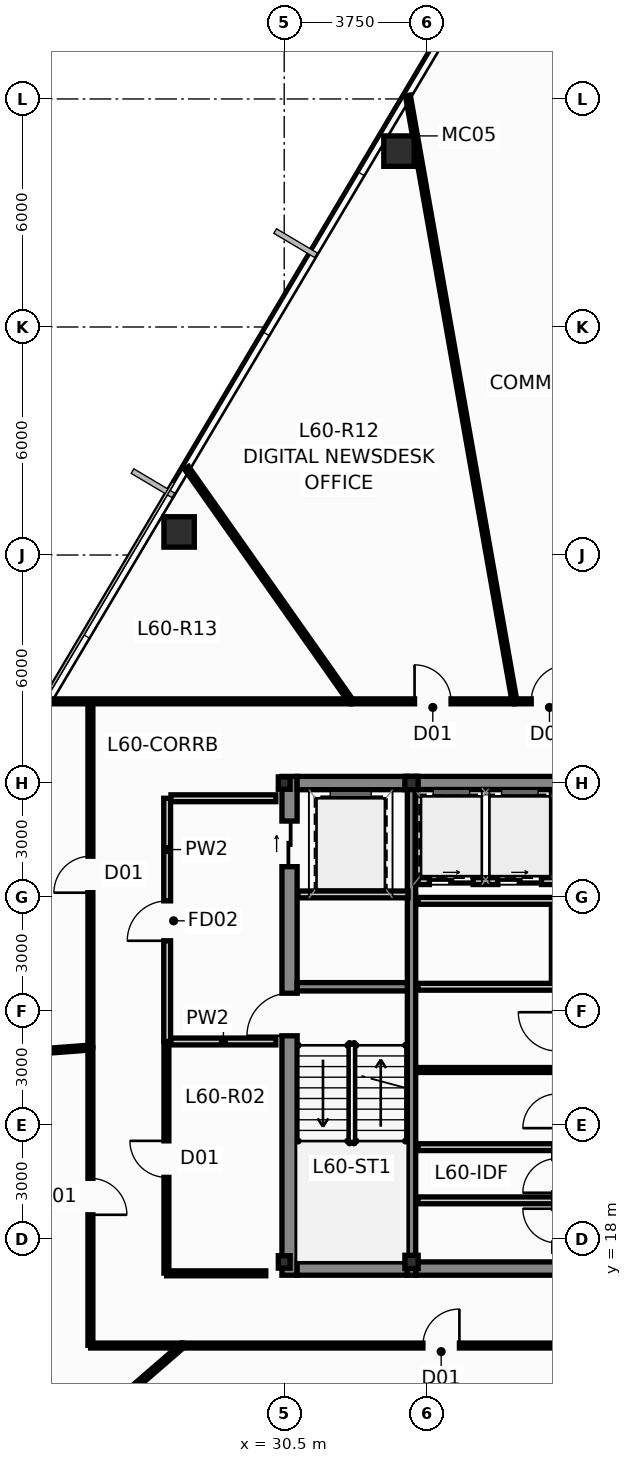
"""IFC4 building model, lengths in metres.
Left out: names, types, materials, properties, quantities, classifications, styles, units other than length and angle.
Written with IfcOpenShell. Run it as: python <this file> out.ifc"""

import sys

from ifc_helpers import new_model, si_unit, direction, frame, frame_2d, origin, origin_2d, place, context, subcontext, project, spatial, rectangle, hollow_rectangle, i_section, extrude, source, transform, mapped, element, fill, save


model = new_model("IFC4")
c1 = context("Model", 3, precision=1e-05, world=origin(), true_north=direction((0.0, 1.0)))
c2 = subcontext(c1, "Body", "Model", "MODEL_VIEW")
j1 = project(units=[si_unit("LENGTHUNIT", "METRE"), si_unit("PLANEANGLEUNIT", "RADIAN")], contexts=[c1])
p1 = place(None, origin())
s1 = spatial("IfcSite", under=j1, at=p1, CompositionType="ELEMENT")
p2 = place(p1, origin())
s2 = spatial("IfcBuilding", under=s1, at=p2, CompositionType="ELEMENT")
p3 = place(p2, frame((0.0, 0.0, 229.85)))
s3 = spatial("IfcBuildingStorey", under=s2, at=p3, CompositionType="ELEMENT", Elevation=229.85)
m1 = source(origin(), c2, "Body", "SweptSolid", [
    extrude(i_section(OverallWidth=0.311, OverallDepth=0.327, WebThickness=0.016, FlangeThickness=0.025, at=origin_2d()), origin(), (0.0, 0.0, 1.0), 3.65),
])
for number, where, z_axis, x_axis in (
    (1, (30.5, 17.4, 0.0), (0.0, 0.0, 1.0), (1.0, 0.0, 0.0)),
    (2, (30.5, 30.0, 0.0), (0.0, 0.0, 1.0), (1.0, 0.0, 0.0)),
):
    element("IfcColumn", number, at=place(p3, frame(where, z_axis=z_axis, x_axis=x_axis)), inside=s3, PredefinedType="COLUMN", context=c2, shape_type="MappedRepresentation", body=[
        mapped(m1, transform((0.0, 0.0, 0.0), scale=1.0)),
    ])
m2 = source(origin(), c2, "Body", "SweptSolid", [
    extrude(hollow_rectangle(XDim=0.35, YDim=0.35, WallThickness=0.016, at=origin_2d()), origin(), (0.0, 0.0, 1.0), 3.65),
])
for number, where, z_axis, x_axis in (
    (3, (33.85, 17.4, 0.0), (0.0, 0.0, 1.0), (1.0, 0.0, 0.0)),
    (4, (33.85, 30.0, 0.0), (0.0, 0.0, 1.0), (1.0, 0.0, 0.0)),
):
    element("IfcColumn", number, at=place(p3, frame(where, z_axis=z_axis, x_axis=x_axis)), inside=s3, PredefinedType="COLUMN", context=c2, shape_type="MappedRepresentation", body=[
        mapped(m2, transform((0.0, 0.0, 0.0), scale=1.0)),
    ])
p4 = place(p3, frame((30.64, 17.05, 0.0), z_axis=(0.0, 0.0, 1.0), x_axis=(0.0, 1.0, 0.0)))
e5 = element("IfcWall", 5, at=p4, inside=s3, PredefinedType="SHEAR", context=c2, shape_type="SweptSolid", body=[
    extrude(rectangle(XDim=13.125, YDim=0.4, at=frame_2d((6.562, 0.0))), origin(), (0.0, 0.0, 1.0), 3.65),
])
p5 = place(p4, frame((6.3, 0.0, 0.0)))
e6 = element("IfcOpeningElement", 6, at=p5, cuts=e5, PredefinedType="OPENING", context=c2, shape_type="SweptSolid", body=[
    extrude(rectangle(XDim=1.12, YDim=2.15, at=frame_2d((0.56, 1.075))), frame((0.0, 0.212, 0.0), z_axis=(0.0, -1.0, 0.0), x_axis=(1.0, 0.0, 0.0)), (0.0, 0.0, 1.0), 0.424),
])
p6 = place(p4, frame((10.75, 0.0, 0.0)))
e7 = element("IfcOpeningElement", 7, at=p6, cuts=e5, PredefinedType="OPENING", context=c2, shape_type="SweptSolid", body=[
    extrude(rectangle(XDim=1.2, YDim=2.2, at=frame_2d((0.6, 1.1))), frame((0.0, 0.212, 0.0), z_axis=(0.0, -1.0, 0.0), x_axis=(1.0, 0.0, 0.0)), (0.0, 0.0, 1.0), 0.424),
])
p7 = place(p3, frame((30.84, 17.225, 0.0), z_axis=(0.0, 0.0, 1.0), x_axis=(1.0, 0.0, 0.0)))
e8 = element("IfcWall", 8, at=p7, inside=s3, PredefinedType="SHEAR", context=c2, shape_type="SweptSolid", body=[
    extrude(rectangle(XDim=2.9, YDim=0.35, at=frame_2d((1.45, 0.0))), origin(), (0.0, 0.0, 1.0), 3.65),
])
p8 = place(p3, frame((33.96, 17.225, 0.0), z_axis=(0.0, 0.0, 1.0), x_axis=(1.0, 0.0, 0.0)))
e9 = element("IfcWall", 9, at=p8, inside=s3, PredefinedType="SHEAR", context=c2, shape_type="SweptSolid", body=[
    extrude(rectangle(XDim=8.08, YDim=0.35, at=frame_2d((4.04, 0.0))), origin(), (0.0, 0.0, 1.0), 3.65),
])
p9 = place(p3, frame((30.84, 30.0, 0.0), z_axis=(0.0, 0.0, 1.0), x_axis=(1.0, 0.0, 0.0)))
e10 = element("IfcWall", 10, at=p9, inside=s3, PredefinedType="SHEAR", context=c2, shape_type="SweptSolid", body=[
    extrude(rectangle(XDim=2.9, YDim=0.35, at=frame_2d((1.45, 0.0))), origin(), (0.0, 0.0, 1.0), 3.65),
])
p10 = place(p3, frame((33.96, 30.0, 0.0), z_axis=(0.0, 0.0, 1.0), x_axis=(1.0, 0.0, 0.0)))
e11 = element("IfcWall", 11, at=p10, inside=s3, PredefinedType="SHEAR", context=c2, shape_type="SweptSolid", body=[
    extrude(rectangle(XDim=3.78, YDim=0.35, at=frame_2d((1.89, 0.0))), origin(), (0.0, 0.0, 1.0), 3.65),
])
p11 = place(p3, frame((33.85, 17.05, 0.0), z_axis=(0.0, 0.0, 1.0), x_axis=(0.0, 1.0, 0.0)))
e12 = element("IfcWall", 12, at=p11, inside=s3, PredefinedType="SHEAR", context=c2, shape_type="SweptSolid", body=[
    extrude(rectangle(XDim=13.125, YDim=0.22, at=frame_2d((6.562, 0.0))), origin(), (0.0, 0.0, 1.0), 3.65),
])
p12 = place(p3, frame((30.84, 24.64, 0.0), z_axis=(0.0, 0.0, 1.0), x_axis=(1.0, 0.0, 0.0)))
e13 = element("IfcWall", 13, at=p12, inside=s3, PredefinedType="SHEAR", context=c2, shape_type="SweptSolid", body=[
    extrude(rectangle(XDim=2.9, YDim=0.22, at=frame_2d((1.45, 0.0))), origin(), (0.0, 0.0, 1.0), 3.65),
])
m3 = source(origin(), c2, "Body", "SweptSolid", [
    extrude(hollow_rectangle(XDim=0.8, YDim=0.8, WallThickness=0.045, at=origin_2d()), origin(), (0.0, 0.0, 1.0), 3.651),
])
p13 = place(p3, frame((33.52, 46.628, 0.0), z_axis=(0.023872754168, 0.001805502416, 0.999713374808), x_axis=(-0.075414875552, 0.997152243414, 0.0)))
e14 = element("IfcColumn", 14, at=p13, inside=s3, PredefinedType="COLUMN", context=c2, shape_type="MappedRepresentation", body=[
    mapped(m3, transform((0.0, 0.0, 0.0), scale=1.0)),
])
m4 = source(origin(), c2, "Body", "SweptSolid", [
    extrude(hollow_rectangle(XDim=0.8, YDim=0.8, WallThickness=0.045, at=origin_2d()), origin(), (0.0, 0.0, 1.0), 3.651),
])
p14 = place(p3, frame((27.734, 36.607, 0.0), z_axis=(0.019393985636, -0.006085698941, 0.999793397452), x_axis=(0.299398805134, 0.954128060317, 0.0)))
e15 = element("IfcColumn", 15, at=p14, inside=s3, PredefinedType="COLUMN", context=c2, shape_type="MappedRepresentation", body=[
    mapped(m4, transform((0.0, 0.0, 0.0), scale=1.0)),
])
p15 = place(p3, frame((34.02, 26.9, 0.0), z_axis=(0.0, 0.0, 1.0), x_axis=(1.0, 0.0, 0.0)))
e16 = element("IfcWall", 16, at=p15, inside=s3, PredefinedType="PARTITIONING", context=c2, shape_type="SweptSolid", body=[
    extrude(rectangle(XDim=3.6, YDim=0.18, at=frame_2d((1.8, 0.0))), origin(), (0.0, 0.0, 1.0), 3.4),
])
p16 = place(p3, frame((37.62, 24.8, 0.0), z_axis=(0.0, 0.0, 1.0), x_axis=(0.0, 1.0, 0.0)))
e17 = element("IfcWall", 17, at=p16, inside=s3, PredefinedType="PARTITIONING", context=c2, shape_type="SweptSolid", body=[
    extrude(rectangle(XDim=2.0, YDim=0.18, at=frame_2d((1.0, 0.0))), origin(), (0.0, 0.0, 1.0), 3.4),
])
p17 = place(p3, frame((34.02, 24.64, 0.0), z_axis=(0.0, 0.0, 1.0), x_axis=(1.0, 0.0, 0.0)))
e18 = element("IfcWall", 18, at=p17, inside=s3, PredefinedType="PARTITIONING", context=c2, shape_type="SweptSolid", body=[
    extrude(rectangle(XDim=3.68, YDim=0.18, at=frame_2d((1.84, 0.0))), origin(), (0.0, 0.0, 1.0), 3.4),
])
p18 = place(p3, frame((34.02, 27.42, 0.0), z_axis=(0.0, 0.0, 1.0), x_axis=(1.0, 0.0, 0.0)))
e19 = element("IfcWall", 19, at=p18, inside=s3, PredefinedType="PARTITIONING", context=c2, shape_type="SweptSolid", body=[
    extrude(rectangle(XDim=3.66, YDim=0.18, at=frame_2d((1.83, 0.0))), origin(), (0.0, 0.0, 1.0), 3.4),
])
p19 = place(p18, frame((0.3, 0.0, 0.0)))
e20 = element("IfcOpeningElement", 20, at=p19, cuts=e19, PredefinedType="OPENING", context=c2, shape_type="SweptSolid", body=[
    extrude(rectangle(XDim=1.15, YDim=2.2, at=frame_2d((0.575, 1.1))), frame((0.0, 0.102, 0.0), z_axis=(0.0, -1.0, 0.0), x_axis=(1.0, 0.0, 0.0)), (0.0, 0.0, 1.0), 0.204),
])
p20 = place(p18, frame((2.1, 0.0, 0.0)))
e21 = element("IfcOpeningElement", 21, at=p20, cuts=e19, PredefinedType="OPENING", context=c2, shape_type="SweptSolid", body=[
    extrude(rectangle(XDim=1.15, YDim=2.2, at=frame_2d((0.575, 1.1))), frame((0.0, 0.102, 0.0), z_axis=(0.0, -1.0, 0.0), x_axis=(1.0, 0.0, 0.0)), (0.0, 0.0, 1.0), 0.204),
])
p21 = place(p3, frame((37.62, 27.64, 0.0), z_axis=(0.0, 0.0, 1.0), x_axis=(0.0, 1.0, 0.0)))
e22 = element("IfcWall", 22, at=p21, inside=s3, PredefinedType="PARTITIONING", context=c2, shape_type="SweptSolid", body=[
    extrude(rectangle(XDim=2.11, YDim=0.18, at=frame_2d((1.055, 0.0))), origin(), (0.0, 0.0, 1.0), 3.4),
])
p22 = place(p3, frame((27.42, 23.2, 0.0), z_axis=(0.0, 0.0, 1.0), x_axis=(0.0, 1.0, 0.0)))
e23 = element("IfcWall", 23, at=p22, inside=s3, PredefinedType="PARTITIONING", context=c2, shape_type="SweptSolid", body=[
    extrude(rectangle(XDim=6.4, YDim=0.18, at=frame_2d((3.2, 0.0))), origin(), (0.0, 0.0, 1.0), 3.129),
])
p23 = place(p22, frame((2.65, 0.0, 0.0)))
e24 = element("IfcOpeningElement", 24, at=p23, cuts=e23, PredefinedType="OPENING", context=c2, shape_type="SweptSolid", body=[
    extrude(rectangle(XDim=1.05, YDim=2.15, at=frame_2d((0.525, 1.075))), frame((0.0, 0.102, 0.0), z_axis=(0.0, -1.0, 0.0), x_axis=(1.0, 0.0, 0.0)), (0.0, 0.0, 1.0), 0.204),
])
p24 = place(p3, frame((27.52, 23.2, 0.0), z_axis=(0.0, 0.0, 1.0), x_axis=(1.0, 0.0, 0.0)))
e25 = element("IfcWall", 25, at=p24, inside=s3, PredefinedType="PARTITIONING", context=c2, shape_type="SweptSolid", body=[
    extrude(rectangle(XDim=2.76, YDim=0.18, at=frame_2d((1.38, 0.0))), origin(), (0.0, 0.0, 1.0), 3.4),
])
p25 = place(p3, frame((27.52, 29.6, 0.0), z_axis=(0.0, 0.0, 1.0), x_axis=(1.0, 0.0, 0.0)))
e26 = element("IfcWall", 26, at=p25, inside=s3, PredefinedType="PARTITIONING", context=c2, shape_type="SweptSolid", body=[
    extrude(rectangle(XDim=2.76, YDim=0.18, at=frame_2d((1.38, 0.0))), origin(), (0.0, 0.0, 1.0), 2.985),
])
p26 = place(p3, frame((30.86, 27.07, 0.0), z_axis=(0.0, 0.0, 1.0), x_axis=(1.0, 0.0, 0.0)))
e27 = element("IfcWall", 27, at=p26, inside=s3, PredefinedType="PARTITIONING", context=c2, shape_type="SweptSolid", body=[
    extrude(rectangle(XDim=2.9, YDim=0.18, at=frame_2d((1.45, 0.0))), origin(), (0.0, 0.0, 1.0), 3.4),
])
p27 = place(p3, frame((34.02, 20.42, 0.0), z_axis=(0.0, 0.0, 1.0), x_axis=(1.0, 0.0, 0.0)))
e28 = element("IfcWall", 28, at=p27, inside=s3, PredefinedType="PARTITIONING", context=c2, shape_type="SweptSolid", body=[
    extrude(rectangle(XDim=3.64, YDim=0.18, at=frame_2d((1.82, 0.0))), origin(), (0.0, 0.0, 1.0), 3.4),
])
p28 = place(p3, frame((34.02, 22.45, 0.0), z_axis=(0.0, 0.0, 1.0), x_axis=(1.0, 0.0, 0.0)))
e29 = element("IfcWall", 29, at=p28, inside=s3, PredefinedType="PARTITIONING", context=c2, shape_type="SweptSolid", body=[
    extrude(rectangle(XDim=3.58, YDim=0.13, at=frame_2d((1.79, 0.0))), origin(), (0.0, 0.0, 1.0), 3.4),
])
p29 = place(p3, frame((34.02, 19.02, 0.0), z_axis=(0.0, 0.0, 1.0), x_axis=(1.0, 0.0, 0.0)))
e30 = element("IfcWall", 30, at=p29, inside=s3, PredefinedType="PARTITIONING", context=c2, shape_type="SweptSolid", body=[
    extrude(rectangle(XDim=3.58, YDim=0.18, at=frame_2d((1.79, 0.0))), origin(), (0.0, 0.0, 1.0), 3.4),
])
p30 = place(p3, frame((33.754, 48.093, 0.0), z_axis=(0.0, 0.0, 1.0), x_axis=(0.17333175086, -0.984863495183, 0.0)))
e31 = element("IfcWall", 31, at=p30, inside=s3, PredefinedType="PARTITIONING", context=c2, shape_type="SweptSolid", body=[
    extrude(rectangle(XDim=16.182, YDim=0.13, at=frame_2d((8.091, 0.0))), origin(), (0.0, 0.0, 1.0), 3.4),
])
p31 = place(p3, frame((27.825, 15.2, 0.0), z_axis=(0.0, 0.0, 1.0), x_axis=(1.0, 0.0, 0.0)))
e32 = element("IfcWall", 32, at=p31, inside=s3, PredefinedType="PARTITIONING", context=c2, shape_type="SweptSolid", body=[
    extrude(rectangle(XDim=13.61, YDim=0.13, at=frame_2d((6.805, 0.0))), origin(), (0.0, 0.0, 1.0), 3.4),
])
p32 = place(p31, frame((6.325, 0.0, 0.0)))
e33 = element("IfcOpeningElement", 33, at=p32, cuts=e32, PredefinedType="OPENING", context=c2, shape_type="SweptSolid", body=[
    extrude(rectangle(XDim=0.96, YDim=2.15, at=frame_2d((0.48, 1.075))), frame((0.0, 0.077, 0.0), z_axis=(0.0, -1.0, 0.0), x_axis=(1.0, 0.0, 0.0)), (0.0, 0.0, 1.0), 0.154),
])
p33 = place(p3, frame((25.4, 23.045, 0.0), z_axis=(0.0, 0.0, 1.0), x_axis=(0.0, 1.0, 0.0)))
e34 = element("IfcWall", 34, at=p33, inside=s3, PredefinedType="PARTITIONING", context=c2, shape_type="SweptSolid", body=[
    extrude(rectangle(XDim=9.1, YDim=0.13, at=frame_2d((4.55, 0.0))), origin(), (0.0, 0.0, 1.0), 3.129),
])
p34 = place(p33, frame((4.07, 0.0, 0.0)))
e35 = element("IfcOpeningElement", 35, at=p34, cuts=e34, PredefinedType="OPENING", context=c2, shape_type="SweptSolid", body=[
    extrude(rectangle(XDim=0.96, YDim=2.15, at=frame_2d((0.48, 1.075))), frame((0.0, 0.077, 0.0), z_axis=(0.0, -1.0, 0.0), x_axis=(1.0, 0.0, 0.0)), (0.0, 0.0, 1.0), 0.154),
])
p35 = place(p3, frame((25.4, 23.035, 0.0), z_axis=(0.0, 0.0, 1.0), x_axis=(0.0, -1.0, 0.0)))
e36 = element("IfcWall", 36, at=p35, inside=s3, PredefinedType="PARTITIONING", context=c2, shape_type="SweptSolid", body=[
    extrude(rectangle(XDim=7.83, YDim=0.13, at=frame_2d((3.915, 0.0))), origin(), (0.0, 0.0, 1.0), 3.129),
])
p36 = place(p35, frame((3.435, 0.0, 0.0)))
e37 = element("IfcOpeningElement", 37, at=p36, cuts=e36, PredefinedType="OPENING", context=c2, shape_type="SweptSolid", body=[
    extrude(rectangle(XDim=0.96, YDim=2.15, at=frame_2d((0.48, 1.075))), frame((0.0, 0.077, 0.0), z_axis=(0.0, -1.0, 0.0), x_axis=(1.0, 0.0, 0.0)), (0.0, 0.0, 1.0), 0.154),
])
p37 = place(p3, frame((27.931, 38.293, 0.0), z_axis=(0.0, 0.0, 1.0), x_axis=(0.576007841944, -0.817444166912, 0.0)))
e38 = element("IfcWall", 38, at=p37, inside=s3, PredefinedType="PARTITIONING", context=c2, shape_type="SweptSolid", body=[
    extrude(rectangle(XDim=7.51, YDim=0.13, at=frame_2d((3.755, 0.0))), origin(), (0.0, 0.0, 1.0), 3.4),
])
p38 = place(p3, frame((18.563, 22.529, 0.0), z_axis=(0.0, 0.0, 1.0), x_axis=(0.997209201341, 0.074657945067, 0.0)))
e39 = element("IfcWall", 39, at=p38, inside=s3, PredefinedType="PARTITIONING", context=c2, shape_type="SweptSolid", body=[
    extrude(rectangle(XDim=6.851, YDim=0.13, at=frame_2d((3.425, 0.0))), origin(), (0.0, 0.0, 1.0), 3.4),
])
p39 = place(p3, frame((24.306, 32.15, 0.0), z_axis=(0.0, 0.0, 1.0), x_axis=(1.0, 0.0, 0.0)))
e40 = element("IfcWall", 40, at=p39, inside=s3, PredefinedType="PARTITIONING", context=c2, shape_type="SweptSolid", body=[
    extrude(rectangle(XDim=7.948, YDim=0.13, at=frame_2d((3.974, 0.0))), origin(), (0.0, 0.0, 1.0), 3.4),
])
p40 = place(p3, frame((27.4, 17.105, 0.0), z_axis=(0.0, 0.0, 1.0), x_axis=(0.0, 1.0, 0.0)))
e41 = element("IfcWall", 41, at=p40, inside=s3, PredefinedType="PARTITIONING", context=c2, shape_type="SweptSolid", body=[
    extrude(rectangle(XDim=6.0, YDim=0.13, at=frame_2d((3.0, 0.0))), origin(), (0.0, 0.0, 1.0), 3.4),
])
p41 = place(p40, frame((2.52, 0.0, 0.0)))
e42 = element("IfcOpeningElement", 42, at=p41, cuts=e41, PredefinedType="OPENING", context=c2, shape_type="SweptSolid", body=[
    extrude(rectangle(XDim=0.96, YDim=2.15, at=frame_2d((0.48, 1.075))), frame((0.0, 0.077, 0.0), z_axis=(0.0, -1.0, 0.0), x_axis=(1.0, 0.0, 0.0)), (0.0, 0.0, 1.0), 0.154),
])
p42 = place(p3, frame((23.524, 11.483, 0.0), z_axis=(0.0, 0.0, 1.0), x_axis=(0.756178505734, 0.654365392931, 0.0)))
e43 = element("IfcWall", 43, at=p42, inside=s3, PredefinedType="PARTITIONING", context=c2, shape_type="SweptSolid", body=[
    extrude(rectangle(XDim=5.676, YDim=0.13, at=frame_2d((2.838, 0.0))), origin(), (0.0, 0.0, 1.0), 2.985),
])
p43 = place(p3, frame((32.265, 32.15, 0.0), z_axis=(0.0, 0.0, 1.0), x_axis=(1.0, 0.0, 0.0)))
e44 = element("IfcWall", 44, at=p43, inside=s3, PredefinedType="PARTITIONING", context=c2, shape_type="SweptSolid", body=[
    extrude(rectangle(XDim=4.29, YDim=0.13, at=frame_2d((2.145, 0.0))), origin(), (0.0, 0.0, 1.0), 3.4),
])
p44 = place(p43, frame((1.665, 0.0, 0.0)))
e45 = element("IfcOpeningElement", 45, at=p44, cuts=e44, PredefinedType="OPENING", context=c2, shape_type="SweptSolid", body=[
    extrude(rectangle(XDim=0.96, YDim=2.15, at=frame_2d((0.48, 1.075))), frame((0.0, 0.077, 0.0), z_axis=(0.0, -1.0, 0.0), x_axis=(1.0, 0.0, 0.0)), (0.0, 0.0, 1.0), 0.154),
])
p45 = place(p3, frame((30.015, 17.1, 0.0), z_axis=(0.0, 0.0, 1.0), x_axis=(-1.0, 0.0, 0.0)))
e46 = element("IfcWall", 46, at=p45, inside=s3, PredefinedType="PARTITIONING", context=c2, shape_type="SweptSolid", body=[
    extrude(rectangle(XDim=2.61, YDim=0.13, at=frame_2d((1.305, 0.0))), origin(), (0.0, 0.0, 1.0), 2.985),
])
p46 = place(p3, frame((25.405, 15.2, 0.0), z_axis=(0.0, 0.0, 1.0), x_axis=(1.0, 0.0, 0.0)))
e47 = element("IfcWall", 47, at=p46, inside=s3, PredefinedType="PARTITIONING", context=c2, shape_type="SweptSolid", body=[
    extrude(rectangle(XDim=2.41, YDim=0.13, at=frame_2d((1.205, 0.0))), origin(), (0.0, 0.0, 1.0), 3.4),
])
p47 = place(p3, frame((36.565, 32.15, 0.0), z_axis=(0.0, 0.0, 1.0), x_axis=(1.0, 0.0, 0.0)))
e48 = element("IfcWall", 48, at=p47, inside=s3, PredefinedType="PARTITIONING", context=c2, shape_type="SweptSolid", body=[
    extrude(rectangle(XDim=1.83, YDim=0.13, at=frame_2d((0.915, 0.0))), origin(), (0.0, 0.0, 1.0), 3.4),
])
p48 = place(p47, frame((0.435, 0.0, 0.0)))
e49 = element("IfcOpeningElement", 49, at=p48, cuts=e48, PredefinedType="OPENING", context=c2, shape_type="SweptSolid", body=[
    extrude(rectangle(XDim=0.96, YDim=2.15, at=frame_2d((0.48, 1.075))), frame((0.0, 0.077, 0.0), z_axis=(0.0, -1.0, 0.0), x_axis=(1.0, 0.0, 0.0)), (0.0, 0.0, 1.0), 0.154),
])
p49 = place(p5, origin())
e50 = element("IfcDoor", 50, at=p49, inside=s3, OperationType="SINGLE_SWING_LEFT", PredefinedType="DOOR", context=c2, shape_type="SweptSolid", body=[
    extrude(rectangle(XDim=1.12, YDim=2.15, at=frame_2d((0.56, 1.075))), frame((0.0, 0.025, 0.0), z_axis=(0.0, -1.0, 0.0), x_axis=(1.0, 0.0, 0.0)), (0.0, 0.0, 1.0), 0.05),
])
fill(e6, e50)
p50 = place(p6, origin())
e51 = element("IfcDoor", 51, at=p50, inside=s3, OperationType="SLIDING_TO_LEFT", PredefinedType="DOOR", context=c2, shape_type="SweptSolid", body=[
    extrude(rectangle(XDim=1.2, YDim=2.2, at=frame_2d((0.6, 1.1))), frame((0.0, 0.025, 0.0), z_axis=(0.0, -1.0, 0.0), x_axis=(1.0, 0.0, 0.0)), (0.0, 0.0, 1.0), 0.05),
])
fill(e7, e51)
p51 = place(p19, origin())
e52 = element("IfcDoor", 52, at=p51, inside=s3, OperationType="SLIDING_TO_RIGHT", PredefinedType="DOOR", context=c2, shape_type="SweptSolid", body=[
    extrude(rectangle(XDim=1.15, YDim=2.2, at=frame_2d((0.575, 1.1))), frame((0.0, 0.025, 0.0), z_axis=(0.0, -1.0, 0.0), x_axis=(1.0, 0.0, 0.0)), (0.0, 0.0, 1.0), 0.05),
])
fill(e20, e52)
p52 = place(p20, origin())
e53 = element("IfcDoor", 53, at=p52, inside=s3, OperationType="SLIDING_TO_LEFT", PredefinedType="DOOR", context=c2, shape_type="SweptSolid", body=[
    extrude(rectangle(XDim=1.15, YDim=2.2, at=frame_2d((0.575, 1.1))), frame((0.0, 0.025, 0.0), z_axis=(0.0, -1.0, 0.0), x_axis=(1.0, 0.0, 0.0)), (0.0, 0.0, 1.0), 0.05),
])
fill(e21, e53)
p53 = place(p23, origin())
e54 = element("IfcDoor", 54, at=p53, inside=s3, OperationType="SINGLE_SWING_LEFT", PredefinedType="DOOR", context=c2, shape_type="SweptSolid", body=[
    extrude(rectangle(XDim=1.05, YDim=2.15, at=frame_2d((0.525, 1.075))), frame((0.0, 0.025, 0.0), z_axis=(0.0, -1.0, 0.0), x_axis=(1.0, 0.0, 0.0)), (0.0, 0.0, 1.0), 0.05),
])
fill(e24, e54)
p54 = place(p32, origin())
e55 = element("IfcDoor", 55, at=p54, inside=s3, OperationType="SINGLE_SWING_RIGHT", PredefinedType="DOOR", context=c2, shape_type="SweptSolid", body=[
    extrude(rectangle(XDim=0.96, YDim=2.15, at=frame_2d((0.48, 1.075))), frame((0.0, 0.025, 0.0), z_axis=(0.0, -1.0, 0.0), x_axis=(1.0, 0.0, 0.0)), (0.0, 0.0, 1.0), 0.05),
])
fill(e33, e55)
p55 = place(p34, origin())
e56 = element("IfcDoor", 56, at=p55, inside=s3, OperationType="SINGLE_SWING_LEFT", PredefinedType="DOOR", context=c2, shape_type="SweptSolid", body=[
    extrude(rectangle(XDim=0.96, YDim=2.15, at=frame_2d((0.48, 1.075))), frame((0.0, 0.025, 0.0), z_axis=(0.0, -1.0, 0.0), x_axis=(1.0, 0.0, 0.0)), (0.0, 0.0, 1.0), 0.05),
])
fill(e35, e56)
p56 = place(p36, origin())
e57 = element("IfcDoor", 57, at=p56, inside=s3, OperationType="SINGLE_SWING_RIGHT", PredefinedType="DOOR", context=c2, shape_type="SweptSolid", body=[
    extrude(rectangle(XDim=0.96, YDim=2.15, at=frame_2d((0.48, 1.075))), frame((0.0, 0.025, 0.0), z_axis=(0.0, -1.0, 0.0), x_axis=(1.0, 0.0, 0.0)), (0.0, 0.0, 1.0), 0.05),
])
fill(e37, e57)
p57 = place(p41, origin())
e58 = element("IfcDoor", 58, at=p57, inside=s3, OperationType="SINGLE_SWING_RIGHT", PredefinedType="DOOR", context=c2, shape_type="SweptSolid", body=[
    extrude(rectangle(XDim=0.96, YDim=2.15, at=frame_2d((0.48, 1.075))), frame((0.0, 0.025, 0.0), z_axis=(0.0, -1.0, 0.0), x_axis=(1.0, 0.0, 0.0)), (0.0, 0.0, 1.0), 0.05),
])
fill(e42, e58)
p58 = place(p44, origin())
e59 = element("IfcDoor", 59, at=p58, inside=s3, OperationType="SINGLE_SWING_LEFT", PredefinedType="DOOR", context=c2, shape_type="SweptSolid", body=[
    extrude(rectangle(XDim=0.96, YDim=2.15, at=frame_2d((0.48, 1.075))), frame((0.0, 0.025, 0.0), z_axis=(0.0, -1.0, 0.0), x_axis=(1.0, 0.0, 0.0)), (0.0, 0.0, 1.0), 0.05),
])
fill(e45, e59)
p59 = place(p48, origin())
e60 = element("IfcDoor", 60, at=p59, inside=s3, OperationType="SINGLE_SWING_RIGHT", PredefinedType="DOOR", context=c2, shape_type="SweptSolid", body=[
    extrude(rectangle(XDim=0.96, YDim=2.15, at=frame_2d((0.48, 1.075))), frame((0.0, 0.025, 0.0), z_axis=(0.0, -1.0, 0.0), x_axis=(1.0, 0.0, 0.0)), (0.0, 0.0, 1.0), 0.05),
])
fill(e49, e60)
save(model, sys.argv[1])
